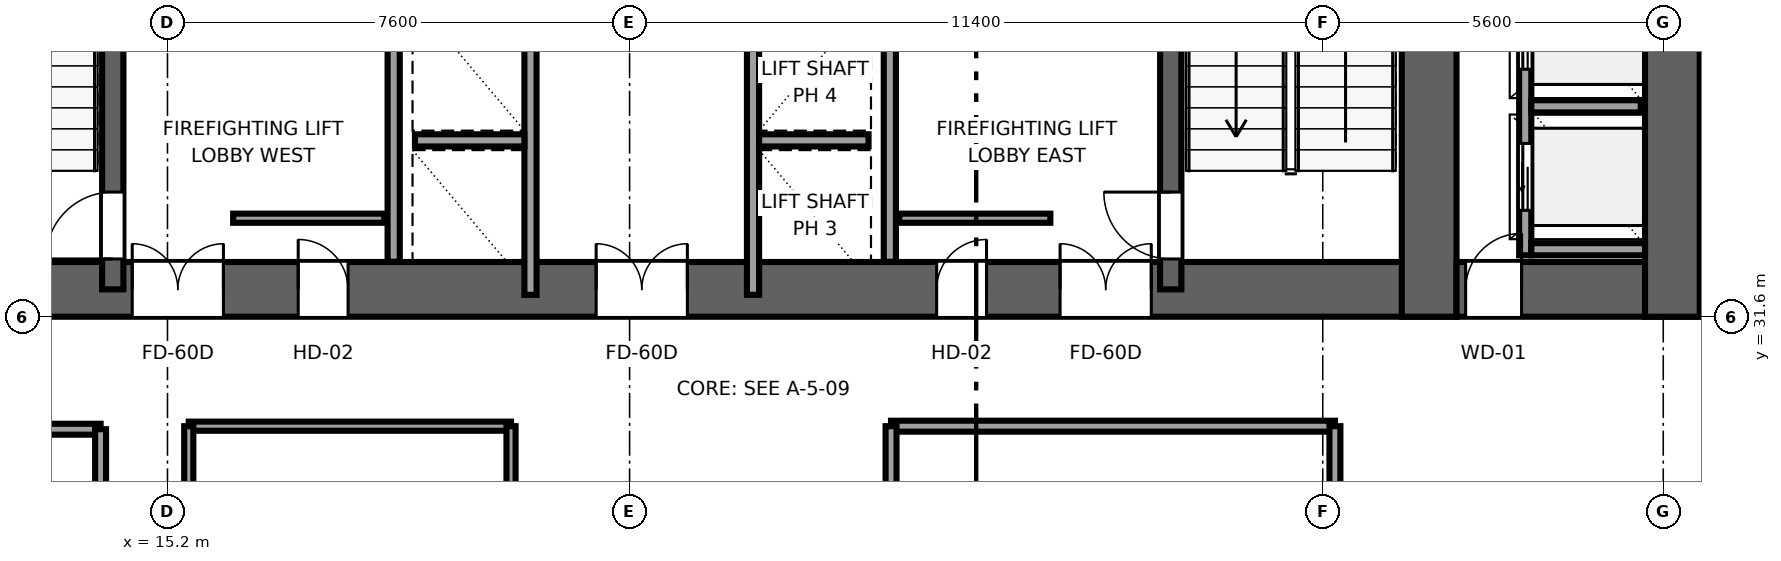
"""IFC4 building model, lengths in metres.
Left out: names, types, materials, properties, quantities, classifications, styles, units other than length and angle.
Written with IfcOpenShell. Run it as: python <this file> out.ifc"""

import sys

from ifc_helpers import new_model, si_unit, direction, frame, frame_2d, origin, place, context, subcontext, project, spatial, rectangle, extrude, source, transform, mapped, element, fill, save


model = new_model("IFC4")
c1 = context("Model", 3, precision=1e-05, world=origin(), true_north=direction((0.0, 1.0)))
c2 = subcontext(c1, "Body", "Model", "MODEL_VIEW")
j1 = project(units=[si_unit("LENGTHUNIT", "METRE"), si_unit("PLANEANGLEUNIT", "RADIAN")], contexts=[c1])
p1 = place(None, origin())
s1 = spatial("IfcSite", under=j1, at=p1, CompositionType="ELEMENT")
p2 = place(p1, origin())
s2 = spatial("IfcBuilding", under=s1, at=p2, CompositionType="ELEMENT")
p3 = place(p2, frame((0.0, 0.0, 92.35)))
s3 = spatial("IfcBuildingStorey", under=s2, at=p3, CompositionType="ELEMENT", Elevation=92.35)
p4 = place(p3, frame((9.6, 32.05, 0.0), z_axis=(0.0, 0.0, 1.0), x_axis=(1.0, 0.0, 0.0)))
e1 = element("IfcWall", 1, at=p4, inside=s3, PredefinedType="SHEAR", context=c2, shape_type="SweptSolid", body=[
    extrude(rectangle(XDim=26.8, YDim=0.9, at=frame_2d((13.4, 0.0))), origin(), (0.0, 0.0, 1.0), 3.55),
])
p5 = place(p4, frame((6.52, 0.0, 0.0), z_axis=(0.0, 0.0, 1.0), x_axis=(-1.0, 0.0, 0.0)))
e2 = element("IfcOpeningElement", 2, at=p5, cuts=e1, PredefinedType="OPENING", context=c2, shape_type="SweptSolid", body=[
    extrude(rectangle(XDim=1.5, YDim=2.04, at=frame_2d((0.75, 1.02))), frame((0.0, 0.46, 0.0), z_axis=(0.0, -1.0, 0.0), x_axis=(1.0, 0.0, 0.0)), (0.0, 0.0, 1.0), 0.92),
])
p6 = place(p4, frame((14.15, 0.0, 0.0), z_axis=(0.0, 0.0, 1.0), x_axis=(-1.0, 0.0, 0.0)))
e3 = element("IfcOpeningElement", 3, at=p6, cuts=e1, PredefinedType="OPENING", context=c2, shape_type="SweptSolid", body=[
    extrude(rectangle(XDim=1.5, YDim=2.04, at=frame_2d((0.75, 1.02))), frame((0.0, 0.46, 0.0), z_axis=(0.0, -1.0, 0.0), x_axis=(1.0, 0.0, 0.0)), (0.0, 0.0, 1.0), 0.92),
])
p7 = place(p4, frame((21.78, 0.0, 0.0), z_axis=(0.0, 0.0, 1.0), x_axis=(-1.0, 0.0, 0.0)))
e4 = element("IfcOpeningElement", 4, at=p7, cuts=e1, PredefinedType="OPENING", context=c2, shape_type="SweptSolid", body=[
    extrude(rectangle(XDim=1.5, YDim=2.04, at=frame_2d((0.75, 1.02))), frame((0.0, 0.46, 0.0), z_axis=(0.0, -1.0, 0.0), x_axis=(1.0, 0.0, 0.0)), (0.0, 0.0, 1.0), 0.92),
])
p8 = place(p4, frame((8.57, 0.0, 0.0), z_axis=(0.0, 0.0, 1.0), x_axis=(-1.0, 0.0, 0.0)))
e5 = element("IfcOpeningElement", 5, at=p8, cuts=e1, PredefinedType="OPENING", context=c2, shape_type="SweptSolid", body=[
    extrude(rectangle(XDim=0.82, YDim=2.01, at=frame_2d((0.41, 1.005))), frame((0.0, 0.46, 0.0), z_axis=(0.0, -1.0, 0.0), x_axis=(1.0, 0.0, 0.0)), (0.0, 0.0, 1.0), 0.92),
])
p9 = place(p4, frame((19.07, 0.0, 0.0), z_axis=(0.0, 0.0, 1.0), x_axis=(-1.0, 0.0, 0.0)))
e6 = element("IfcOpeningElement", 6, at=p9, cuts=e1, PredefinedType="OPENING", context=c2, shape_type="SweptSolid", body=[
    extrude(rectangle(XDim=0.82, YDim=2.01, at=frame_2d((0.41, 1.005))), frame((0.0, 0.46, 0.0), z_axis=(0.0, -1.0, 0.0), x_axis=(1.0, 0.0, 0.0)), (0.0, 0.0, 1.0), 0.92),
])
p10 = place(p3, frame((35.95, 31.6, 0.0), z_axis=(0.0, 0.0, 1.0), x_axis=(0.0, 1.0, 0.0)))
e7 = element("IfcWall", 7, at=p10, inside=s3, PredefinedType="SHEAR", context=c2, shape_type="SweptSolid", body=[
    extrude(rectangle(XDim=13.6, YDim=0.9, at=frame_2d((6.8, 0.0))), origin(), (0.0, 0.0, 1.0), 3.55),
])
p11 = place(p3, frame((14.3, 32.05, 0.0), z_axis=(0.0, 0.0, 1.0), x_axis=(0.0, 1.0, 0.0)))
e8 = element("IfcWall", 8, at=p11, inside=s3, PredefinedType="SHEAR", context=c2, shape_type="SweptSolid", body=[
    extrude(rectangle(XDim=12.7, YDim=0.35, at=frame_2d((6.35, 0.0))), origin(), (0.0, 0.0, 1.0), 3.55),
])
p12 = place(p11, frame((0.5, 0.0, 0.0)))
e9 = element("IfcOpeningElement", 9, at=p12, cuts=e8, PredefinedType="OPENING", context=c2, shape_type="SweptSolid", body=[
    extrude(rectangle(XDim=1.1, YDim=2.12, at=frame_2d((0.55, 1.06))), frame((0.0, 0.185, 0.0), z_axis=(0.0, -1.0, 0.0), x_axis=(1.0, 0.0, 0.0)), (0.0, 0.0, 1.0), 0.37),
])
p13 = place(p3, frame((31.7, 32.05, 0.0), z_axis=(0.0, 0.0, 1.0), x_axis=(0.0, 1.0, 0.0)))
e10 = element("IfcWall", 10, at=p13, inside=s3, PredefinedType="SHEAR", context=c2, shape_type="SweptSolid", body=[
    extrude(rectangle(XDim=12.7, YDim=0.35, at=frame_2d((6.35, 0.0))), origin(), (0.0, 0.0, 1.0), 3.55),
])
p14 = place(p13, frame((1.6, 0.0, 0.0), z_axis=(0.0, 0.0, 1.0), x_axis=(-1.0, 0.0, 0.0)))
e11 = element("IfcOpeningElement", 11, at=p14, cuts=e10, PredefinedType="OPENING", context=c2, shape_type="SweptSolid", body=[
    extrude(rectangle(XDim=1.1, YDim=2.12, at=frame_2d((0.55, 1.06))), frame((0.0, 0.185, 0.0), z_axis=(0.0, -1.0, 0.0), x_axis=(1.0, 0.0, 0.0)), (0.0, 0.0, 1.0), 0.37),
])
p15 = place(p3, frame((36.4, 32.05, 0.0), z_axis=(0.0, 0.0, 1.0), x_axis=(1.0, 0.0, 0.0)))
e12 = element("IfcWall", 12, at=p15, inside=s3, PredefinedType="SHEAR", context=c2, shape_type="SweptSolid", body=[
    extrude(rectangle(XDim=4.0, YDim=0.9, at=frame_2d((2.0, 0.0))), origin(), (0.0, 0.0, 1.0), 3.55),
])
p16 = place(p15, frame((1.07, 0.0, 0.0), z_axis=(0.0, 0.0, 1.0), x_axis=(-1.0, 0.0, 0.0)))
e13 = element("IfcOpeningElement", 13, at=p16, cuts=e12, PredefinedType="OPENING", context=c2, shape_type="SweptSolid", body=[
    extrude(rectangle(XDim=0.92, YDim=2.01, at=frame_2d((0.46, 1.005))), frame((0.0, 0.46, 0.0), z_axis=(0.0, -1.0, 0.0), x_axis=(1.0, 0.0, 0.0)), (0.0, 0.0, 1.0), 0.92),
])
p17 = place(p3, frame((39.95, 31.6, 0.0), z_axis=(0.0, 0.0, 1.0), x_axis=(0.0, 1.0, 0.0)))
e14 = element("IfcWall", 14, at=p17, inside=s3, PredefinedType="SHEAR", context=c2, shape_type="SweptSolid", body=[
    extrude(rectangle(XDim=13.6, YDim=0.9, at=frame_2d((6.8, 0.0))), origin(), (0.0, 0.0, 1.0), 3.55),
])
for number, where, z_axis, x_axis in (
    (15, (18.92, 32.504, 0.0), (0.0, 0.0, 1.0), (0.0, 1.0, 0.0)),
    (16, (27.08, 32.504, 0.0), (0.0, 0.0, 1.0), (0.0, 1.0, 0.0)),
):
    element("IfcWall", number, at=place(p3, frame(where, z_axis=z_axis, x_axis=x_axis)), inside=s3, PredefinedType="SOLIDWALL", context=c2, shape_type="SweptSolid", body=[
        extrude(rectangle(XDim=3.646, YDim=0.2, at=frame_2d((1.823, 0.0))), origin(), (0.0, 0.0, 1.0), 3.25),
    ])
p18 = place(p3, frame((21.17, 31.96, 0.0), z_axis=(0.0, 0.0, 1.0), x_axis=(0.0, 1.0, 0.0)))
e17 = element("IfcWall", 17, at=p18, inside=s3, PredefinedType="SOLIDWALL", context=c2, shape_type="SweptSolid", body=[
    extrude(rectangle(XDim=12.58, YDim=0.2, at=frame_2d((6.29, 0.0))), origin(), (0.0, 0.0, 1.0), 3.25),
])
p19 = place(p3, frame((19.27, 34.5, 0.0), z_axis=(0.0, 0.0, 1.0), x_axis=(1.0, 0.0, 0.0)))
e18 = element("IfcWall", 18, at=p19, inside=s3, PredefinedType="SOLIDWALL", context=c2, shape_type="SweptSolid", body=[
    extrude(rectangle(XDim=1.8, YDim=0.2, at=frame_2d((0.9, 0.0))), origin(), (0.0, 0.0, 1.0), 3.25),
])
p20 = place(p3, frame((24.83, 31.96, 0.0), z_axis=(0.0, 0.0, 1.0), x_axis=(0.0, 1.0, 0.0)))
e19 = element("IfcWall", 19, at=p20, inside=s3, PredefinedType="SOLIDWALL", context=c2, shape_type="SweptSolid", body=[
    extrude(rectangle(XDim=12.58, YDim=0.2, at=frame_2d((6.29, 0.0))), origin(), (0.0, 0.0, 1.0), 3.25),
])
p21 = place(p3, frame((24.93, 34.5, 0.0), z_axis=(0.0, 0.0, 1.0), x_axis=(1.0, 0.0, 0.0)))
e20 = element("IfcWall", 20, at=p21, inside=s3, PredefinedType="SOLIDWALL", context=c2, shape_type="SweptSolid", body=[
    extrude(rectangle(XDim=1.8, YDim=0.2, at=frame_2d((0.9, 0.0))), origin(), (0.0, 0.0, 1.0), 3.25),
])
p22 = place(p3, frame((37.53, 32.61, 0.0), z_axis=(0.0, 0.0, 1.0), x_axis=(0.0, 1.0, 0.0)))
e21 = element("IfcWall", 21, at=p22, inside=s3, PredefinedType="SOLIDWALL", context=c2, shape_type="SweptSolid", body=[
    extrude(rectangle(XDim=9.54, YDim=0.2, at=frame_2d((4.77, 0.0))), origin(), (0.0, 0.0, 1.0), 3.25),
])
p23 = place(p22, frame((0.74, 0.0, 0.0)))
e22 = element("IfcOpeningElement", 22, at=p23, cuts=e21, PredefinedType="OPENING", context=c2, shape_type="SweptSolid", body=[
    extrude(rectangle(XDim=1.1, YDim=2.12, at=frame_2d((0.55, 1.06))), frame((0.0, 0.11, 0.0), z_axis=(0.0, -1.0, 0.0), x_axis=(1.0, 0.0, 0.0)), (0.0, 0.0, 1.0), 0.22),
])
p24 = place(p22, frame((3.06, 0.0, 0.0)))
e23 = element("IfcOpeningElement", 23, at=p24, cuts=e21, PredefinedType="OPENING", context=c2, shape_type="SweptSolid", body=[
    extrude(rectangle(XDim=1.1, YDim=2.12, at=frame_2d((0.55, 1.06))), frame((0.0, 0.11, 0.0), z_axis=(0.0, -1.0, 0.0), x_axis=(1.0, 0.0, 0.0)), (0.0, 0.0, 1.0), 0.22),
])
p25 = place(p22, frame((5.38, 0.0, 0.0)))
e24 = element("IfcOpeningElement", 24, at=p25, cuts=e21, PredefinedType="OPENING", context=c2, shape_type="SweptSolid", body=[
    extrude(rectangle(XDim=1.1, YDim=2.12, at=frame_2d((0.55, 1.06))), frame((0.0, 0.11, 0.0), z_axis=(0.0, -1.0, 0.0), x_axis=(1.0, 0.0, 0.0)), (0.0, 0.0, 1.0), 0.22),
])
p26 = place(p22, frame((7.7, 0.0, 0.0)))
e25 = element("IfcOpeningElement", 25, at=p26, cuts=e21, PredefinedType="OPENING", context=c2, shape_type="SweptSolid", body=[
    extrude(rectangle(XDim=1.1, YDim=2.12, at=frame_2d((0.55, 1.06))), frame((0.0, 0.11, 0.0), z_axis=(0.0, -1.0, 0.0), x_axis=(1.0, 0.0, 0.0)), (0.0, 0.0, 1.0), 0.22),
])
p27 = place(p3, frame((37.63, 32.71, 0.0), z_axis=(0.0, 0.0, 1.0), x_axis=(1.0, 0.0, 0.0)))
e26 = element("IfcWall", 26, at=p27, inside=s3, PredefinedType="SOLIDWALL", context=c2, shape_type="SweptSolid", body=[
    extrude(rectangle(XDim=1.87, YDim=0.2, at=frame_2d((0.935, 0.0))), origin(), (0.0, 0.0, 1.0), 3.25),
])
p28 = place(p3, frame((37.63, 35.06, 0.0), z_axis=(0.0, 0.0, 1.0), x_axis=(1.0, 0.0, 0.0)))
e27 = element("IfcWall", 27, at=p28, inside=s3, PredefinedType="SOLIDWALL", context=c2, shape_type="SweptSolid", body=[
    extrude(rectangle(XDim=1.8, YDim=0.2, at=frame_2d((0.9, 0.0))), origin(), (0.0, 0.0, 1.0), 3.25),
])
for number, where, z_axis, x_axis in (
    (28, (16.28, 33.22, 0.0), (0.0, 0.0, 1.0), (1.0, 0.0, 0.0)),
    (29, (27.235, 33.22, 0.0), (0.0, 0.0, 1.0), (1.0, 0.0, 0.0)),
):
    element("IfcWall", number, at=place(p3, frame(where, z_axis=z_axis, x_axis=x_axis)), inside=s3, PredefinedType="PARTITIONING", context=c2, shape_type="SweptSolid", body=[
        extrude(rectangle(XDim=2.485, YDim=0.15, at=frame_2d((1.242, 0.0))), origin(), (0.0, 0.0, 1.0), 3.25),
    ])
p29 = place(p3, frame((9.88, 29.75, 0.0), z_axis=(0.0, 0.0, 1.0), x_axis=(1.0, 0.0, 0.0)))
e30 = element("IfcWall", 30, at=p29, inside=s3, PredefinedType="PARTITIONING", context=c2, shape_type="SweptSolid", body=[
    extrude(rectangle(XDim=4.22, YDim=0.18, at=frame_2d((2.11, 0.0))), origin(), (0.0, 0.0, 1.0), 3.25),
])
p30 = place(p3, frame((14.1, 20.5, 0.0), z_axis=(0.0, 0.0, 1.0), x_axis=(0.0, 1.0, 0.0)))
e31 = element("IfcWall", 31, at=p30, inside=s3, PredefinedType="PARTITIONING", context=c2, shape_type="SweptSolid", body=[
    extrude(rectangle(XDim=9.25, YDim=0.18, at=frame_2d((4.625, 0.0))), origin(), (0.0, 0.0, 1.0), 3.25),
])
p31 = place(p3, frame((27.1, 29.8, 0.0), z_axis=(0.0, 0.0, 1.0), x_axis=(1.0, 0.0, 0.0)))
e32 = element("IfcWall", 32, at=p31, inside=s3, PredefinedType="PARTITIONING", context=c2, shape_type="SweptSolid", body=[
    extrude(rectangle(XDim=7.3, YDim=0.18, at=frame_2d((3.65, 0.0))), origin(), (0.0, 0.0, 1.0), 3.25),
])
for number, where, z_axis, x_axis in (
    (33, (27.1, 20.5, 0.0), (0.0, 0.0, 1.0), (0.0, 1.0, 0.0)),
    (34, (34.4, 20.5, 0.0), (0.0, 0.0, 1.0), (0.0, 1.0, 0.0)),
):
    element("IfcWall", number, at=place(p3, frame(where, z_axis=z_axis, x_axis=x_axis)), inside=s3, PredefinedType="PARTITIONING", context=c2, shape_type="SweptSolid", body=[
        extrude(rectangle(XDim=9.3, YDim=0.18, at=frame_2d((4.65, 0.0))), origin(), (0.0, 0.0, 1.0), 3.25),
    ])
p32 = place(p3, frame((15.55, 29.8, 0.0), z_axis=(0.0, 0.0, 1.0), x_axis=(1.0, 0.0, 0.0)))
e35 = element("IfcWall", 35, at=p32, inside=s3, PredefinedType="PARTITIONING", context=c2, shape_type="SweptSolid", body=[
    extrude(rectangle(XDim=5.3, YDim=0.15, at=frame_2d((2.65, 0.0))), origin(), (0.0, 0.0, 1.0), 3.25),
])
for number, where, z_axis, x_axis in (
    (36, (15.55, 20.5, 0.0), (0.0, 0.0, 1.0), (0.0, 1.0, 0.0)),
    (37, (20.85, 20.5, 0.0), (0.0, 0.0, 1.0), (0.0, 1.0, 0.0)),
):
    element("IfcWall", number, at=place(p3, frame(where, z_axis=z_axis, x_axis=x_axis)), inside=s3, PredefinedType="PARTITIONING", context=c2, shape_type="SweptSolid", body=[
        extrude(rectangle(XDim=9.3, YDim=0.15, at=frame_2d((4.65, 0.0))), origin(), (0.0, 0.0, 1.0), 3.25),
    ])
m1 = source(origin(), c2, "Body", "SweptSolid", [
    extrude(rectangle(XDim=1.1, YDim=2.12, at=frame_2d((0.55, 1.06))), frame((0.0, 0.025, 0.0), z_axis=(0.0, -1.0, 0.0), x_axis=(1.0, 0.0, 0.0)), (0.0, 0.0, 1.0), 0.05),
])
p33 = place(p12, origin())
e38 = element("IfcDoor", 38, at=p33, inside=s3, OperationType="SINGLE_SWING_LEFT", PredefinedType="DOOR", context=c2, shape_type="MappedRepresentation", body=[
    mapped(m1, transform((0.0, 0.0, 0.0), x_axis=(1.0, 0.0, 0.0), y_axis=(0.0, 1.0, 0.0), z_axis=(0.0, 0.0, 1.0), scale=1.0)),
])
fill(e9, e38)
p34 = place(p14, origin())
e39 = element("IfcDoor", 39, at=p34, inside=s3, OperationType="SINGLE_SWING_RIGHT", PredefinedType="DOOR", context=c2, shape_type="MappedRepresentation", body=[
    mapped(m1, transform((0.0, 0.0, 0.0), x_axis=(1.0, 0.0, 0.0), y_axis=(0.0, 1.0, 0.0), z_axis=(0.0, 0.0, 1.0), scale=1.0)),
])
fill(e11, e39)
m2 = source(origin(), c2, "Body", "SweptSolid", [
    extrude(rectangle(XDim=1.5, YDim=2.04, at=frame_2d((0.75, 1.02))), frame((0.0, 0.025, 0.0), z_axis=(0.0, -1.0, 0.0), x_axis=(1.0, 0.0, 0.0)), (0.0, 0.0, 1.0), 0.05),
])
p35 = place(p5, origin())
e40 = element("IfcDoor", 40, at=p35, inside=s3, OperationType="DOUBLE_DOOR_SINGLE_SWING", PredefinedType="DOOR", context=c2, shape_type="MappedRepresentation", body=[
    mapped(m2, transform((0.0, 0.0, 0.0), x_axis=(1.0, 0.0, 0.0), y_axis=(0.0, 1.0, 0.0), z_axis=(0.0, 0.0, 1.0), scale=1.0)),
])
fill(e2, e40)
p36 = place(p6, origin())
e41 = element("IfcDoor", 41, at=p36, inside=s3, OperationType="DOUBLE_DOOR_SINGLE_SWING", PredefinedType="DOOR", context=c2, shape_type="MappedRepresentation", body=[
    mapped(m2, transform((0.0, 0.0, 0.0), x_axis=(1.0, 0.0, 0.0), y_axis=(0.0, 1.0, 0.0), z_axis=(0.0, 0.0, 1.0), scale=1.0)),
])
fill(e3, e41)
p37 = place(p7, origin())
e42 = element("IfcDoor", 42, at=p37, inside=s3, OperationType="DOUBLE_DOOR_SINGLE_SWING", PredefinedType="DOOR", context=c2, shape_type="MappedRepresentation", body=[
    mapped(m2, transform((0.0, 0.0, 0.0), x_axis=(1.0, 0.0, 0.0), y_axis=(0.0, 1.0, 0.0), z_axis=(0.0, 0.0, 1.0), scale=1.0)),
])
fill(e4, e42)
m3 = source(origin(), c2, "Body", "SweptSolid", [
    extrude(rectangle(XDim=0.82, YDim=2.01, at=frame_2d((0.41, 1.005))), frame((0.0, 0.025, 0.0), z_axis=(0.0, -1.0, 0.0), x_axis=(1.0, 0.0, 0.0)), (0.0, 0.0, 1.0), 0.05),
])
p38 = place(p8, origin())
e43 = element("IfcDoor", 43, at=p38, inside=s3, OperationType="SINGLE_SWING_LEFT", PredefinedType="DOOR", context=c2, shape_type="MappedRepresentation", body=[
    mapped(m3, transform((0.0, 0.0, 0.0), x_axis=(1.0, 0.0, 0.0), y_axis=(0.0, 1.0, 0.0), z_axis=(0.0, 0.0, 1.0), scale=1.0)),
])
fill(e5, e43)
p39 = place(p9, origin())
e44 = element("IfcDoor", 44, at=p39, inside=s3, OperationType="SINGLE_SWING_RIGHT", PredefinedType="DOOR", context=c2, shape_type="MappedRepresentation", body=[
    mapped(m3, transform((0.0, 0.0, 0.0), x_axis=(1.0, 0.0, 0.0), y_axis=(0.0, 1.0, 0.0), z_axis=(0.0, 0.0, 1.0), scale=1.0)),
])
fill(e6, e44)
m4 = source(origin(), c2, "Body", "SweptSolid", [
    extrude(rectangle(XDim=0.92, YDim=2.01, at=frame_2d((0.46, 1.005))), frame((0.0, 0.025, 0.0), z_axis=(0.0, -1.0, 0.0), x_axis=(1.0, 0.0, 0.0)), (0.0, 0.0, 1.0), 0.05),
])
p40 = place(p16, origin())
e45 = element("IfcDoor", 45, at=p40, inside=s3, OperationType="SINGLE_SWING_RIGHT", PredefinedType="DOOR", context=c2, shape_type="MappedRepresentation", body=[
    mapped(m4, transform((0.0, 0.0, 0.0), x_axis=(1.0, 0.0, 0.0), y_axis=(0.0, 1.0, 0.0), z_axis=(0.0, 0.0, 1.0), scale=1.0)),
])
fill(e13, e45)
m5 = source(origin(), c2, "Body", "SweptSolid", [
    extrude(rectangle(XDim=1.1, YDim=2.12, at=frame_2d((0.55, 1.06))), frame((0.0, 0.025, 0.0), z_axis=(0.0, -1.0, 0.0), x_axis=(1.0, 0.0, 0.0)), (0.0, 0.0, 1.0), 0.05),
])
p41 = place(p23, origin())
e46 = element("IfcDoor", 46, at=p41, inside=s3, OperationType="SLIDING_TO_LEFT", PredefinedType="DOOR", context=c2, shape_type="MappedRepresentation", body=[
    mapped(m5, transform((0.0, 0.0, 0.0), x_axis=(1.0, 0.0, 0.0), y_axis=(0.0, 1.0, 0.0), z_axis=(0.0, 0.0, 1.0), scale=1.0)),
])
fill(e22, e46)
p42 = place(p24, origin())
e47 = element("IfcDoor", 47, at=p42, inside=s3, OperationType="SLIDING_TO_RIGHT", PredefinedType="DOOR", context=c2, shape_type="MappedRepresentation", body=[
    mapped(m5, transform((0.0, 0.0, 0.0), x_axis=(1.0, 0.0, 0.0), y_axis=(0.0, 1.0, 0.0), z_axis=(0.0, 0.0, 1.0), scale=1.0)),
])
fill(e23, e47)
save(model, sys.argv[1])
